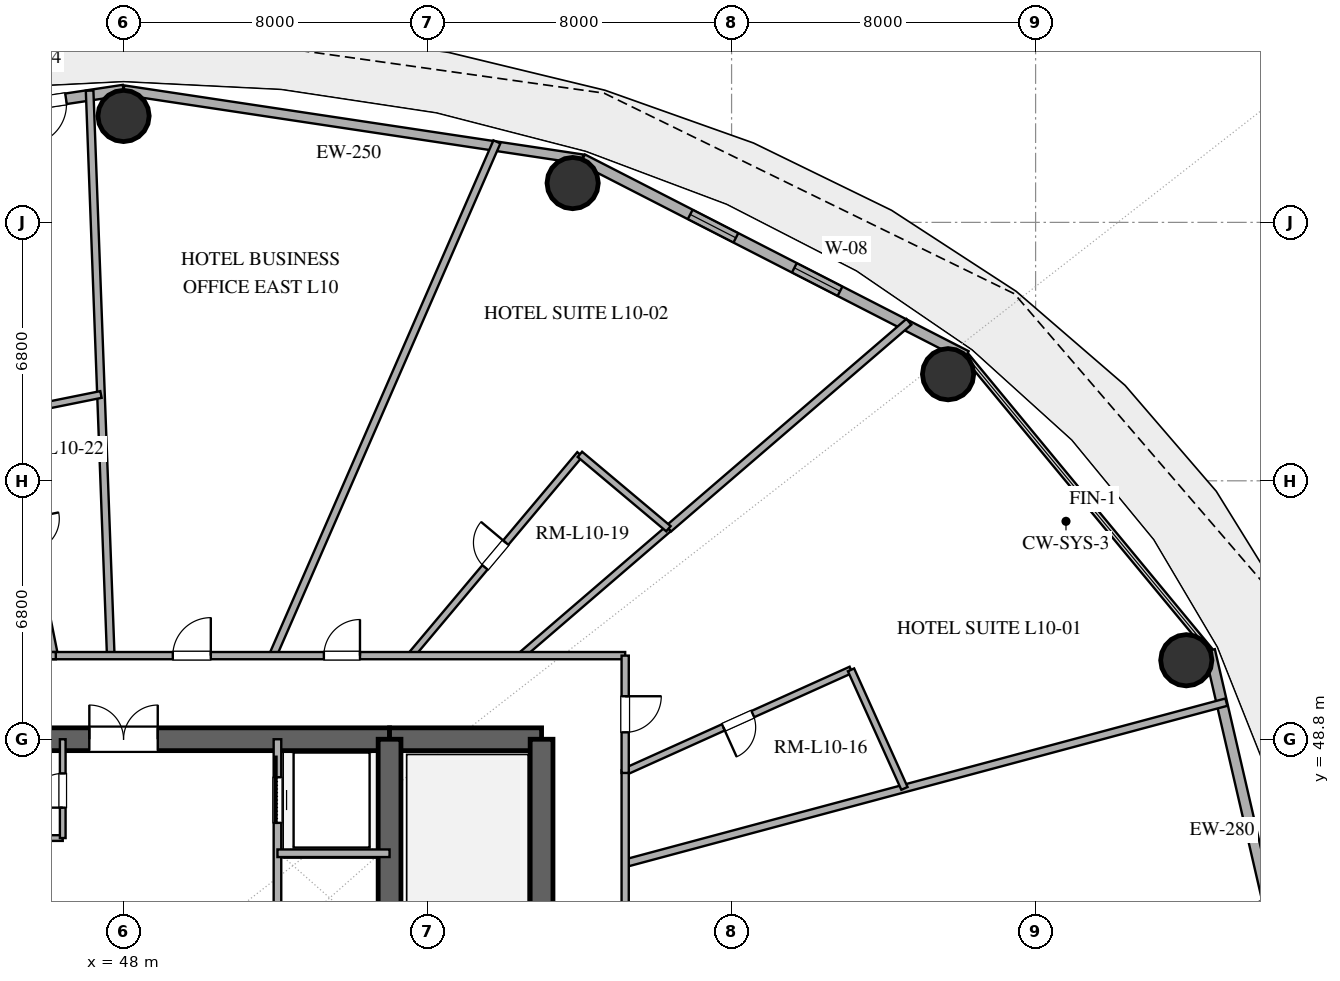
"""IFC4 building model, lengths in metres.
Left out: names, types, materials, properties, quantities, classifications, styles, units other than length and angle.
Written with IfcOpenShell. Run it as: python <this file> out.ifc"""

import sys

from ifc_helpers import new_model, si_unit, direction, frame, frame_2d, origin, origin_2d, place, context, subcontext, project, spatial, rectangle, hollow_circle, extrude, element, fill, save


model = new_model("IFC4")
c1 = context("Model", 3, precision=1e-05, world=origin(), true_north=direction((0.0, 1.0)))
c2 = subcontext(c1, "Body", "Model", "MODEL_VIEW")
j1 = project(units=[si_unit("LENGTHUNIT", "METRE"), si_unit("PLANEANGLEUNIT", "RADIAN")], contexts=[c1])
p1 = place(None, origin())
s1 = spatial("IfcSite", under=j1, at=p1, CompositionType="ELEMENT")
p2 = place(p1, origin())
s2 = spatial("IfcBuilding", under=s1, at=p2, CompositionType="ELEMENT")
p3 = place(p2, frame((0.0, 0.0, 46.2)))
s3 = spatial("IfcBuildingStorey", under=s2, at=p3, CompositionType="ELEMENT", Elevation=46.2)
p4 = place(p3, frame((41.0, 48.8, 0.0), z_axis=(0.0, 0.0, 1.0), x_axis=(1.0, 0.0, 0.0)))
e1 = element("IfcWall", 1, at=p4, inside=s3, PredefinedType="SHEAR", context=c2, shape_type="SweptSolid", body=[
    extrude(rectangle(XDim=14.0, YDim=0.6, at=frame_2d((7.0, 0.0))), origin(), (0.0, 0.0, 1.0), 3.38),
])
p5 = place(p4, frame((6.1, 0.0, 0.0)))
e2 = element("IfcOpeningElement", 2, at=p5, cuts=e1, PredefinedType="OPENING", context=c2, shape_type="SweptSolid", body=[
    extrude(rectangle(XDim=1.8, YDim=2.25, at=frame_2d((0.9, 1.125))), frame((0.0, 0.31, 0.0), z_axis=(0.0, -1.0, 0.0), x_axis=(1.0, 0.0, 0.0)), (0.0, 0.0, 1.0), 0.62),
])
p6 = place(p3, frame((55.0, 48.8, 0.0), z_axis=(0.0, 0.0, 1.0), x_axis=(1.0, 0.0, 0.0)))
e3 = element("IfcWall", 3, at=p6, inside=s3, PredefinedType="SHEAR", context=c2, shape_type="SweptSolid", body=[
    extrude(rectangle(XDim=4.0, YDim=0.6, at=frame_2d((2.0, 0.0))), origin(), (0.0, 0.0, 1.0), 3.38),
])
p7 = place(p3, frame((59.0, 35.2, 0.0), z_axis=(0.0, 0.0, 1.0), x_axis=(0.0, 1.0, 0.0)))
e4 = element("IfcWall", 4, at=p7, inside=s3, PredefinedType="SHEAR", context=c2, shape_type="SweptSolid", body=[
    extrude(rectangle(XDim=13.6, YDim=0.6, at=frame_2d((6.8, 0.0))), origin(), (0.0, 0.0, 1.0), 3.38),
])
p8 = place(p7, frame((1.5, 0.0, 0.0)))
e5 = element("IfcOpeningElement", 5, at=p8, cuts=e4, PredefinedType="OPENING", context=c2, shape_type="SweptSolid", body=[
    extrude(rectangle(XDim=1.2, YDim=2.15, at=frame_2d((0.6, 1.075))), frame((0.0, 0.31, 0.0), z_axis=(0.0, -1.0, 0.0), x_axis=(1.0, 0.0, 0.0)), (0.0, 0.0, 1.0), 0.62),
])
p9 = place(p3, frame((55.0, 35.2, 0.0), z_axis=(0.0, 0.0, 1.0), x_axis=(0.0, 1.0, 0.0)))
e6 = element("IfcWall", 6, at=p9, inside=s3, PredefinedType="SHEAR", context=c2, shape_type="SweptSolid", body=[
    extrude(rectangle(XDim=13.6, YDim=0.6, at=frame_2d((6.8, 0.0))), origin(), (0.0, 0.0, 1.0), 3.38),
])
p10 = place(p9, frame((1.15, 0.0, 0.0)))
e7 = element("IfcOpeningElement", 7, at=p10, cuts=e6, PredefinedType="OPENING", context=c2, shape_type="SweptSolid", body=[
    extrude(rectangle(XDim=1.1, YDim=2.2, at=frame_2d((0.55, 1.1))), frame((0.0, 0.31, 0.0), z_axis=(0.0, -1.0, 0.0), x_axis=(1.0, 0.0, 0.0)), (0.0, 0.0, 1.0), 0.62),
])
for number, where, z_axis, x_axis in (
    (8, (75.966, 50.878, 0.0), (0.0, 0.0, 1.0), (1.0, 0.0, 0.0)),
    (9, (69.697, 58.405, 0.0), (0.0, 0.0, 1.0), (1.0, 0.0, 0.0)),
    (10, (59.818, 63.434, 0.0), (0.0, 0.0, 1.0), (1.0, 0.0, 0.0)),
    (11, (48.0, 65.2, 0.0), (0.0, 0.0, 1.0), (1.0, 0.0, 0.0)),
):
    element("IfcColumn", number, at=place(p3, frame(where, z_axis=z_axis, x_axis=x_axis)), inside=s3, PredefinedType="COLUMN", context=c2, shape_type="SweptSolid", body=[
        extrude(hollow_circle(Radius=0.675, WallThickness=0.036, at=origin_2d()), origin(), (0.0, 0.0, 1.0), 3.38),
    ])
p11 = place(p3, frame((78.696, 42.0, 0.0), z_axis=(0.0, 0.0, 1.0), x_axis=(-0.225454452941, 0.974253709076, 0.0)))
e12 = element("IfcWall", 12, at=p11, inside=s3, PredefinedType="SOLIDWALL", context=c2, shape_type="SweptSolid", body=[
    extrude(rectangle(XDim=9.38, YDim=0.28, at=frame_2d((4.69, 0.0))), origin(), (0.0, 0.0, 1.0), 3.38),
])
p12 = place(p11, frame((1.579, 0.0, 0.0)))
e13 = element("IfcOpeningElement", 13, at=p12, cuts=e12, PredefinedType="OPENING", context=c2, shape_type="SweptSolid", body=[
    extrude(rectangle(XDim=1.1, YDim=2.25, at=frame_2d((0.55, 1.125))), frame((0.0, 0.15, 0.0), z_axis=(0.0, -1.0, 0.0), x_axis=(1.0, 0.0, 0.0)), (0.0, 0.0, 1.0), 0.3),
])
p13 = place(p3, frame((70.174, 58.886, 0.0), z_axis=(0.0, 0.0, 1.0), x_axis=(-0.889853976658, 0.456245438581, 0.0)))
e14 = element("IfcWall", 14, at=p13, inside=s3, PredefinedType="SOLIDWALL", context=c2, shape_type="SweptSolid", body=[
    extrude(rectangle(XDim=11.346, YDim=0.28, at=frame_2d((5.673, 0.0))), origin(), (0.0, 0.0, 1.0), 3.38),
])
p14 = place(p13, frame((3.732, 0.0, 0.85)))
e15 = element("IfcOpeningElement", 15, at=p14, cuts=e14, PredefinedType="OPENING", context=c2, shape_type="SweptSolid", body=[
    extrude(rectangle(XDim=1.35, YDim=1.8, at=frame_2d((0.675, 0.9))), frame((0.0, 0.15, 0.0), z_axis=(0.0, -1.0, 0.0), x_axis=(1.0, 0.0, 0.0)), (0.0, 0.0, 1.0), 0.3),
])
p15 = place(p13, frame((6.811, 0.0, 0.85)))
e16 = element("IfcOpeningElement", 16, at=p15, cuts=e14, PredefinedType="OPENING", context=c2, shape_type="SweptSolid", body=[
    extrude(rectangle(XDim=1.35, YDim=1.8, at=frame_2d((0.675, 0.9))), frame((0.0, 0.15, 0.0), z_axis=(0.0, -1.0, 0.0), x_axis=(1.0, 0.0, 0.0)), (0.0, 0.0, 1.0), 0.3),
])
p16 = place(p3, frame((60.078, 64.062, 0.0), z_axis=(0.0, 0.0, 1.0), x_axis=(-0.988864835849, 0.148816452121, 0.0)))
e17 = element("IfcWall", 17, at=p16, inside=s3, PredefinedType="SOLIDWALL", context=c2, shape_type="SweptSolid", body=[
    extrude(rectangle(XDim=12.214, YDim=0.25, at=frame_2d((6.107, 0.0))), origin(), (0.0, 0.0, 1.0), 3.38),
])
p17 = place(p3, frame((48.0, 65.88, 0.0), z_axis=(0.0, 0.0, 1.0), x_axis=(-0.988864835849, -0.148816452121, 0.0)))
e18 = element("IfcWall", 18, at=p17, inside=s3, PredefinedType="SOLIDWALL", context=c2, shape_type="SweptSolid", body=[
    extrude(rectangle(XDim=12.214, YDim=0.28, at=frame_2d((6.107, 0.0))), origin(), (0.0, 0.0, 1.0), 3.38),
])
p18 = place(p17, frame((1.531, 0.0, 0.0)))
e19 = element("IfcOpeningElement", 19, at=p18, cuts=e18, PredefinedType="OPENING", context=c2, shape_type="SweptSolid", body=[
    extrude(rectangle(XDim=1.05, YDim=2.2, at=frame_2d((0.525, 1.1))), frame((0.0, 0.15, 0.0), z_axis=(0.0, -1.0, 0.0), x_axis=(1.0, 0.0, 0.0)), (0.0, 0.0, 1.0), 0.3),
])
p19 = place(p3, frame((52.05, 38.4, 0.0), z_axis=(0.0, 0.0, 1.0), x_axis=(0.0, 1.0, 0.0)))
e20 = element("IfcWall", 20, at=p19, inside=s3, PredefinedType="SOLIDWALL", context=c2, shape_type="SweptSolid", body=[
    extrude(rectangle(XDim=10.4, YDim=0.2, at=frame_2d((5.2, 0.0))), origin(), (0.0, 0.0, 1.0), 2.74),
])
p20 = place(p19, frame((8.2, 0.0, 0.0)))
e21 = element("IfcOpeningElement", 21, at=p20, cuts=e20, PredefinedType="OPENING", context=c2, shape_type="SweptSolid", body=[
    extrude(rectangle(XDim=1.2, YDim=2.2, at=frame_2d((0.6, 1.1))), frame((0.0, 0.11, 0.0), z_axis=(0.0, -1.0, 0.0), x_axis=(1.0, 0.0, 0.0)), (0.0, 0.0, 1.0), 0.22),
])
p21 = place(p3, frame((52.05, 45.8, 0.0), z_axis=(0.0, 0.0, 1.0), x_axis=(1.0, 0.0, 0.0)))
e22 = element("IfcWall", 22, at=p21, inside=s3, PredefinedType="SOLIDWALL", context=c2, shape_type="SweptSolid", body=[
    extrude(rectangle(XDim=2.95, YDim=0.2, at=frame_2d((1.475, 0.0))), origin(), (0.0, 0.0, 1.0), 2.74),
])
p22 = place(p3, frame((43.95, 46.2, 0.0), z_axis=(0.0, 0.0, 1.0), x_axis=(1.0, 0.0, 0.0)))
e23 = element("IfcWall", 23, at=p22, inside=s3, PredefinedType="PARTITIONING", context=c2, shape_type="SweptSolid", body=[
    extrude(rectangle(XDim=2.45, YDim=0.15, at=frame_2d((1.225, 0.0))), origin(), (0.0, 0.0, 1.0), 2.74),
])
p23 = place(p3, frame((46.4, 46.2, 0.0), z_axis=(0.0, 0.0, 1.0), x_axis=(0.0, 1.0, 0.0)))
e24 = element("IfcWall", 24, at=p23, inside=s3, PredefinedType="PARTITIONING", context=c2, shape_type="SweptSolid", body=[
    extrude(rectangle(XDim=2.6, YDim=0.15, at=frame_2d((1.3, 0.0))), origin(), (0.0, 0.0, 1.0), 2.74),
])
p24 = place(p23, frame((0.8, 0.0, 0.0)))
e25 = element("IfcOpeningElement", 25, at=p24, cuts=e24, PredefinedType="OPENING", context=c2, shape_type="SweptSolid", body=[
    extrude(rectangle(XDim=0.9, YDim=2.15, at=frame_2d((0.45, 1.075))), frame((0.0, 0.085, 0.0), z_axis=(0.0, -1.0, 0.0), x_axis=(1.0, 0.0, 0.0)), (0.0, 0.0, 1.0), 0.17),
])
p25 = place(p3, frame((57.825, 64.519, 0.0), z_axis=(0.0, 0.0, 1.0), x_axis=(-0.399884283786, -0.916565632991, 0.0)))
e26 = element("IfcWall", 26, at=p25, inside=s3, PredefinedType="PARTITIONING", context=c2, shape_type="SweptSolid", body=[
    extrude(rectangle(XDim=14.749, YDim=0.2, at=frame_2d((7.375, 0.0))), origin(), (0.0, 0.0, 1.0), 2.74),
])
p26 = place(p3, frame((61.2, 45.537, 0.0), z_axis=(0.0, 0.0, 1.0), x_axis=(0.965922233104, 0.258832454679, 0.0)))
e27 = element("IfcWall", 27, at=p26, inside=s3, PredefinedType="PARTITIONING", context=c2, shape_type="SweptSolid", body=[
    extrude(rectangle(XDim=16.377, YDim=0.2, at=frame_2d((8.189, 0.0))), origin(), (0.0, 0.0, 1.0), 2.74),
])
p27 = place(p3, frame((68.666, 59.784, 0.0), z_axis=(0.0, 0.0, 1.0), x_axis=(-0.757966817992, -0.652293111127, 0.0)))
e28 = element("IfcWall", 28, at=p27, inside=s3, PredefinedType="PARTITIONING", context=c2, shape_type="SweptSolid", body=[
    extrude(rectangle(XDim=8.347, YDim=0.2, at=frame_2d((4.174, 0.0))), origin(), (0.0, 0.0, 1.0), 2.74),
])
p28 = place(p3, frame((47.663, 51.0, 0.0), z_axis=(0.0, 0.0, 1.0), x_axis=(-0.037384345878, 0.999300961014, 0.0)))
e29 = element("IfcWall", 29, at=p28, inside=s3, PredefinedType="PARTITIONING", context=c2, shape_type="SweptSolid", body=[
    extrude(rectangle(XDim=14.877, YDim=0.2, at=frame_2d((7.438, 0.0))), origin(), (0.0, 0.0, 1.0), 2.74),
])
p29 = place(p3, frame((55.56, 51.0, 0.0), z_axis=(0.0, 0.0, 1.0), x_axis=(0.643154836645, 0.765736153058, 0.0)))
e30 = element("IfcWall", 30, at=p29, inside=s3, PredefinedType="PLUMBINGWALL", context=c2, shape_type="SweptSolid", body=[
    extrude(rectangle(XDim=6.917, YDim=0.18, at=frame_2d((3.458, 0.0))), origin(), (0.0, 0.0, 1.0), 2.74),
])
p30 = place(p29, frame((3.034, 0.0, 0.0)))
e31 = element("IfcOpeningElement", 31, at=p30, cuts=e30, PredefinedType="OPENING", context=c2, shape_type="SweptSolid", body=[
    extrude(rectangle(XDim=0.85, YDim=2.1, at=frame_2d((0.425, 1.05))), frame((0.0, 0.1, 0.0), z_axis=(0.0, -1.0, 0.0), x_axis=(1.0, 0.0, 0.0)), (0.0, 0.0, 1.0), 0.2),
])
p31 = place(p3, frame((67.143, 50.626, 0.0), z_axis=(0.0, 0.0, 1.0), x_axis=(-0.911702033518, -0.410852044025, 0.0)))
e32 = element("IfcWall", 32, at=p31, inside=s3, PredefinedType="PLUMBINGWALL", context=c2, shape_type="SweptSolid", body=[
    extrude(rectangle(XDim=6.519, YDim=0.18, at=frame_2d((3.259, 0.0))), origin(), (0.0, 0.0, 1.0), 2.74),
])
p32 = place(p31, frame((2.834, 0.0, 0.0)))
e33 = element("IfcOpeningElement", 33, at=p32, cuts=e32, PredefinedType="OPENING", context=c2, shape_type="SweptSolid", body=[
    extrude(rectangle(XDim=0.85, YDim=2.1, at=frame_2d((0.425, 1.05))), frame((0.0, 0.1, 0.0), z_axis=(0.0, -1.0, 0.0), x_axis=(1.0, 0.0, 0.0)), (0.0, 0.0, 1.0), 0.2),
])
p33 = place(p3, frame((44.902, 57.367, 0.0), z_axis=(0.0, 0.0, 1.0), x_axis=(0.197648412503, -0.980272974755, 0.0)))
e34 = element("IfcWall", 34, at=p33, inside=s3, PredefinedType="PLUMBINGWALL", context=c2, shape_type="SweptSolid", body=[
    extrude(rectangle(XDim=6.495, YDim=0.18, at=frame_2d((3.248, 0.0))), origin(), (0.0, 0.0, 1.0), 2.74),
])
p34 = place(p33, frame((2.823, 0.0, 0.0)))
e35 = element("IfcOpeningElement", 35, at=p34, cuts=e34, PredefinedType="OPENING", context=c2, shape_type="SweptSolid", body=[
    extrude(rectangle(XDim=0.85, YDim=2.1, at=frame_2d((0.425, 1.05))), frame((0.0, 0.1, 0.0), z_axis=(0.0, -1.0, 0.0), x_axis=(1.0, 0.0, 0.0)), (0.0, 0.0, 1.0), 0.2),
])
p35 = place(p3, frame((62.339, 54.339, 0.0), z_axis=(0.0, 0.0, 1.0), x_axis=(-0.757969199921, -0.652290343307, 0.0)))
e36 = element("IfcWall", 36, at=p35, inside=s3, PredefinedType="PLUMBINGWALL", context=c2, shape_type="SweptSolid", body=[
    extrude(rectangle(XDim=5.119, YDim=0.18, at=frame_2d((2.56, 0.0))), origin(), (0.0, 0.0, 1.0), 2.74),
])
p36 = place(p3, frame((46.153, 51.0, 0.0), z_axis=(0.0, 0.0, 1.0), x_axis=(1.0, 0.0, 0.0)))
e37 = element("IfcWall", 37, at=p36, inside=s3, PredefinedType="PARTITIONING", context=c2, shape_type="SweptSolid", body=[
    extrude(rectangle(XDim=15.047, YDim=0.19, at=frame_2d((7.524, 0.0))), origin(), (0.0, 0.0, 1.0), 2.74),
])
p37 = place(p36, frame((3.144, 0.0, 0.0)))
e38 = element("IfcOpeningElement", 38, at=p37, cuts=e37, PredefinedType="OPENING", context=c2, shape_type="SweptSolid", body=[
    extrude(rectangle(XDim=1.0, YDim=2.2, at=frame_2d((0.5, 1.1))), frame((0.0, 0.105, 0.0), z_axis=(0.0, -1.0, 0.0), x_axis=(1.0, 0.0, 0.0)), (0.0, 0.0, 1.0), 0.21),
])
p38 = place(p36, frame((7.119, 0.0, 0.0)))
e39 = element("IfcOpeningElement", 39, at=p38, cuts=e37, PredefinedType="OPENING", context=c2, shape_type="SweptSolid", body=[
    extrude(rectangle(XDim=0.95, YDim=2.15, at=frame_2d((0.475, 1.075))), frame((0.0, 0.105, 0.0), z_axis=(0.0, -1.0, 0.0), x_axis=(1.0, 0.0, 0.0)), (0.0, 0.0, 1.0), 0.21),
])
p39 = place(p3, frame((61.2, 47.983, 0.0), z_axis=(0.0, 0.0, 1.0), x_axis=(0.0, -1.0, 0.0)))
e40 = element("IfcWall", 40, at=p39, inside=s3, PredefinedType="PARTITIONING", context=c2, shape_type="SweptSolid", body=[
    extrude(rectangle(XDim=6.351, YDim=0.19, at=frame_2d((3.176, 0.0))), origin(), (0.0, 0.0, 1.0), 2.74),
])
p40 = place(p39, frame((3.907, 0.0, 0.0)))
e41 = element("IfcOpeningElement", 41, at=p40, cuts=e40, PredefinedType="OPENING", context=c2, shape_type="SweptSolid", body=[
    extrude(rectangle(XDim=0.95, YDim=2.15, at=frame_2d((0.475, 1.075))), frame((0.0, 0.105, 0.0), z_axis=(0.0, -1.0, 0.0), x_axis=(1.0, 0.0, 0.0)), (0.0, 0.0, 1.0), 0.21),
])
p41 = place(p3, frame((68.549, 47.506, 0.0), z_axis=(0.0, 0.0, 1.0), x_axis=(-0.410839223928, 0.911707810695, 0.0)))
e42 = element("IfcWall", 42, at=p41, inside=s3, PredefinedType="PLUMBINGWALL", context=c2, shape_type="SweptSolid", body=[
    extrude(rectangle(XDim=3.422, YDim=0.18, at=frame_2d((1.711, 0.0))), origin(), (0.0, 0.0, 1.0), 2.74),
])
p42 = place(p3, frame((61.2, 51.0, 0.0), z_axis=(0.0, 0.0, 1.0), x_axis=(0.0, -1.0, 0.0)))
e43 = element("IfcWall", 43, at=p42, inside=s3, PredefinedType="PARTITIONING", context=c2, shape_type="SweptSolid", body=[
    extrude(rectangle(XDim=3.087, YDim=0.19, at=frame_2d((1.543, 0.0))), origin(), (0.0, 0.0, 1.0), 2.74),
])
p43 = place(p42, frame((1.069, 0.0, 0.0)))
e44 = element("IfcOpeningElement", 44, at=p43, cuts=e43, PredefinedType="OPENING", context=c2, shape_type="SweptSolid", body=[
    extrude(rectangle(XDim=0.95, YDim=2.15, at=frame_2d((0.475, 1.075))), frame((0.0, 0.105, 0.0), z_axis=(0.0, -1.0, 0.0), x_axis=(1.0, 0.0, 0.0)), (0.0, 0.0, 1.0), 0.21),
])
p44 = place(p3, frame((60.008, 56.297, 0.0), z_axis=(0.0, 0.0, 1.0), x_axis=(0.765736471754, -0.643154457208, 0.0)))
e45 = element("IfcWall", 45, at=p44, inside=s3, PredefinedType="PLUMBINGWALL", context=c2, shape_type="SweptSolid", body=[
    extrude(rectangle(XDim=3.043, YDim=0.18, at=frame_2d((1.521, 0.0))), origin(), (0.0, 0.0, 1.0), 2.74),
])
p45 = place(p3, frame((43.207, 51.0, 0.0), z_axis=(0.0, 0.0, 1.0), x_axis=(1.0, 0.0, 0.0)))
e46 = element("IfcWall", 46, at=p45, inside=s3, PredefinedType="PARTITIONING", context=c2, shape_type="SweptSolid", body=[
    extrude(rectangle(XDim=3.011, YDim=0.19, at=frame_2d((1.505, 0.0))), origin(), (0.0, 0.0, 1.0), 2.74),
])
p46 = place(p45, frame((1.03, 0.0, 0.0)))
e47 = element("IfcOpeningElement", 47, at=p46, cuts=e46, PredefinedType="OPENING", context=c2, shape_type="SweptSolid", body=[
    extrude(rectangle(XDim=0.95, YDim=2.15, at=frame_2d((0.475, 1.075))), frame((0.0, 0.105, 0.0), z_axis=(0.0, -1.0, 0.0), x_axis=(1.0, 0.0, 0.0)), (0.0, 0.0, 1.0), 0.21),
])
p47 = place(p3, frame((47.406, 57.872, 0.0), z_axis=(0.0, 0.0, 1.0), x_axis=(-0.980278128955, -0.1976228476, 0.0)))
e48 = element("IfcWall", 48, at=p47, inside=s3, PredefinedType="PLUMBINGWALL", context=c2, shape_type="SweptSolid", body=[
    extrude(rectangle(XDim=2.555, YDim=0.18, at=frame_2d((1.277, 0.0))), origin(), (0.0, 0.0, 1.0), 2.74),
])
p48 = place(p14, origin())
e49 = element("IfcWindow", 49, at=p48, inside=s3, PartitioningType="SINGLE_PANEL", PredefinedType="WINDOW", context=c2, shape_type="SweptSolid", body=[
    extrude(rectangle(XDim=1.35, YDim=1.8, at=frame_2d((0.675, 0.9))), frame((0.0, 0.03, 0.0), z_axis=(0.0, -1.0, 0.0), x_axis=(1.0, 0.0, 0.0)), (0.0, 0.0, 1.0), 0.06),
])
fill(e15, e49)
p49 = place(p15, origin())
e50 = element("IfcWindow", 50, at=p49, inside=s3, PartitioningType="SINGLE_PANEL", PredefinedType="WINDOW", context=c2, shape_type="SweptSolid", body=[
    extrude(rectangle(XDim=1.35, YDim=1.8, at=frame_2d((0.675, 0.9))), frame((0.0, 0.03, 0.0), z_axis=(0.0, -1.0, 0.0), x_axis=(1.0, 0.0, 0.0)), (0.0, 0.0, 1.0), 0.06),
])
fill(e16, e50)
p50 = place(p18, origin())
e51 = element("IfcDoor", 51, at=p50, inside=s3, OperationType="SINGLE_SWING_RIGHT", PredefinedType="DOOR", context=c2, shape_type="SweptSolid", body=[
    extrude(rectangle(XDim=1.05, YDim=2.2, at=frame_2d((0.525, 1.1))), frame((0.0, 0.025, 0.0), z_axis=(0.0, -1.0, 0.0), x_axis=(1.0, 0.0, 0.0)), (0.0, 0.0, 1.0), 0.05),
])
fill(e19, e51)
p51 = place(p5, origin())
e52 = element("IfcDoor", 52, at=p51, inside=s3, OperationType="DOUBLE_DOOR_SINGLE_SWING", PredefinedType="DOOR", context=c2, shape_type="SweptSolid", body=[
    extrude(rectangle(XDim=1.8, YDim=2.25, at=frame_2d((0.9, 1.125))), frame((0.0, 0.025, 0.0), z_axis=(0.0, -1.0, 0.0), x_axis=(1.0, 0.0, 0.0)), (0.0, 0.0, 1.0), 0.05),
])
fill(e2, e52)
p52 = place(p20, origin())
e53 = element("IfcDoor", 53, at=p52, inside=s3, OperationType="SLIDING_TO_RIGHT", PredefinedType="DOOR", context=c2, shape_type="SweptSolid", body=[
    extrude(rectangle(XDim=1.2, YDim=2.2, at=frame_2d((0.6, 1.1))), frame((0.0, 0.025, 0.0), z_axis=(0.0, -1.0, 0.0), x_axis=(1.0, 0.0, 0.0)), (0.0, 0.0, 1.0), 0.05),
])
fill(e21, e53)
p53 = place(p24, origin())
e54 = element("IfcDoor", 54, at=p53, inside=s3, OperationType="SINGLE_SWING_LEFT", PredefinedType="DOOR", context=c2, shape_type="SweptSolid", body=[
    extrude(rectangle(XDim=0.9, YDim=2.15, at=frame_2d((0.45, 1.075))), frame((0.0, 0.025, 0.0), z_axis=(0.0, -1.0, 0.0), x_axis=(1.0, 0.0, 0.0)), (0.0, 0.0, 1.0), 0.05),
])
fill(e25, e54)
p54 = place(p30, origin())
e55 = element("IfcDoor", 55, at=p54, inside=s3, OperationType="SINGLE_SWING_RIGHT", PredefinedType="DOOR", context=c2, shape_type="SweptSolid", body=[
    extrude(rectangle(XDim=0.85, YDim=2.1, at=frame_2d((0.425, 1.05))), frame((0.0, 0.025, 0.0), z_axis=(0.0, -1.0, 0.0), x_axis=(1.0, 0.0, 0.0)), (0.0, 0.0, 1.0), 0.05),
])
fill(e31, e55)
p55 = place(p32, origin())
e56 = element("IfcDoor", 56, at=p55, inside=s3, OperationType="SINGLE_SWING_RIGHT", PredefinedType="DOOR", context=c2, shape_type="SweptSolid", body=[
    extrude(rectangle(XDim=0.85, YDim=2.1, at=frame_2d((0.425, 1.05))), frame((0.0, 0.025, 0.0), z_axis=(0.0, -1.0, 0.0), x_axis=(1.0, 0.0, 0.0)), (0.0, 0.0, 1.0), 0.05),
])
fill(e33, e56)
p56 = place(p37, origin())
e57 = element("IfcDoor", 57, at=p56, inside=s3, OperationType="SINGLE_SWING_RIGHT", PredefinedType="DOOR", context=c2, shape_type="SweptSolid", body=[
    extrude(rectangle(XDim=1.0, YDim=2.2, at=frame_2d((0.5, 1.1))), frame((0.0, 0.025, 0.0), z_axis=(0.0, -1.0, 0.0), x_axis=(1.0, 0.0, 0.0)), (0.0, 0.0, 1.0), 0.05),
])
fill(e38, e57)
p57 = place(p38, origin())
e58 = element("IfcDoor", 58, at=p57, inside=s3, OperationType="SINGLE_SWING_RIGHT", PredefinedType="DOOR", context=c2, shape_type="SweptSolid", body=[
    extrude(rectangle(XDim=0.95, YDim=2.15, at=frame_2d((0.475, 1.075))), frame((0.0, 0.025, 0.0), z_axis=(0.0, -1.0, 0.0), x_axis=(1.0, 0.0, 0.0)), (0.0, 0.0, 1.0), 0.05),
])
fill(e39, e58)
p58 = place(p43, origin())
e59 = element("IfcDoor", 59, at=p58, inside=s3, OperationType="SINGLE_SWING_LEFT", PredefinedType="DOOR", context=c2, shape_type="SweptSolid", body=[
    extrude(rectangle(XDim=0.95, YDim=2.15, at=frame_2d((0.475, 1.075))), frame((0.0, 0.025, 0.0), z_axis=(0.0, -1.0, 0.0), x_axis=(1.0, 0.0, 0.0)), (0.0, 0.0, 1.0), 0.05),
])
fill(e44, e59)
save(model, sys.argv[1])
